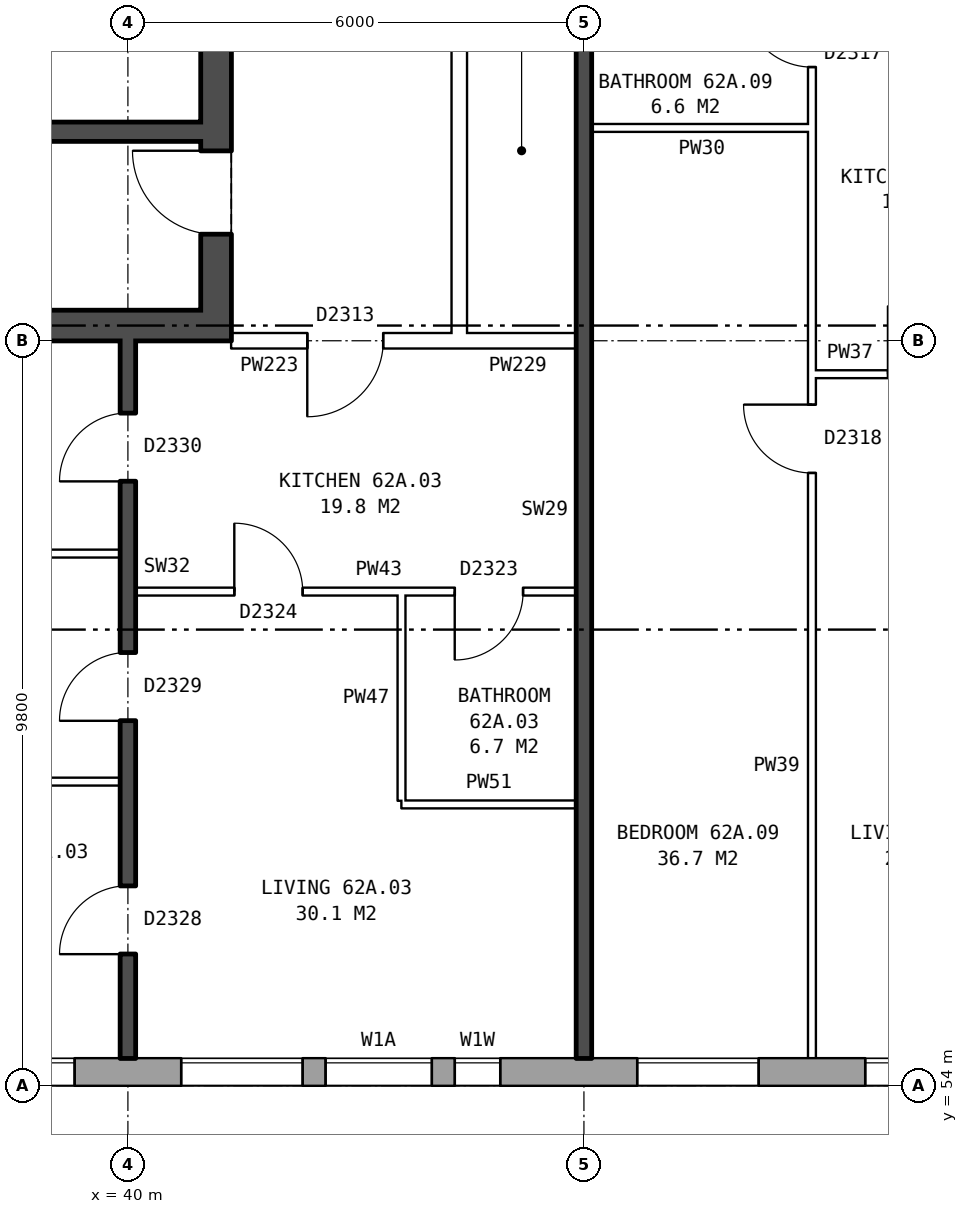
"""IFC4 building model, lengths in metres.
Left out: names, types, materials, properties, quantities, classifications, styles, units other than length and angle.
Written with IfcOpenShell. Run it as: python <this file> out.ifc"""

import sys

from ifc_helpers import new_model, si_unit, direction, frame, frame_2d, origin, place, context, subcontext, project, spatial, rectangle, extrude, element, fill, save


model = new_model("IFC4")
c1 = context("Model", 3, precision=1e-05, world=origin(), true_north=direction((0.0, 1.0)))
c2 = subcontext(c1, "Body", "Model", "MODEL_VIEW")
j1 = project(units=[si_unit("LENGTHUNIT", "METRE"), si_unit("PLANEANGLEUNIT", "RADIAN")], contexts=[c1])
p1 = place(None, origin())
s1 = spatial("IfcSite", under=j1, at=p1, CompositionType="ELEMENT")
p2 = place(p1, origin())
s2 = spatial("IfcBuilding", under=s1, at=p2, CompositionType="ELEMENT")
p3 = place(p2, frame((0.0, 0.0, 221.4)))
s3 = spatial("IfcBuildingStorey", under=s2, at=p3, CompositionType="ELEMENT", Elevation=221.4)
p4 = place(p3, frame((35.075, 54.18, 0.0), z_axis=(0.0, 0.0, 1.0), x_axis=(1.0, 0.0, 0.0)))
e1 = element("IfcWall", 1, at=p4, inside=s3, PredefinedType="STANDARD", context=c2, shape_type="SweptSolid", body=[
    extrude(rectangle(XDim=39.875, YDim=0.36, at=frame_2d((19.938, 0.0))), origin(), (0.0, 0.0, 1.0), 2.85),
])
p5 = place(p4, frame((2.625, 0.0, 0.8)))
e2 = element("IfcOpeningElement", 2, at=p5, cuts=e1, PredefinedType="OPENING", context=c2, shape_type="SweptSolid", body=[
    extrude(rectangle(XDim=1.6, YDim=1.8, at=frame_2d((0.8, 0.9))), frame((0.0, 0.19, 0.0), z_axis=(0.0, -1.0, 0.0), x_axis=(1.0, 0.0, 0.0)), (0.0, 0.0, 1.0), 0.38),
])
p6 = place(p4, frame((5.625, 0.0, 0.8)))
e3 = element("IfcOpeningElement", 3, at=p6, cuts=e1, PredefinedType="OPENING", context=c2, shape_type="SweptSolid", body=[
    extrude(rectangle(XDim=1.6, YDim=1.8, at=frame_2d((0.8, 0.9))), frame((0.0, 0.19, 0.0), z_axis=(0.0, -1.0, 0.0), x_axis=(1.0, 0.0, 0.0)), (0.0, 0.0, 1.0), 0.38),
])
p7 = place(p4, frame((7.525, 0.0, 0.8)))
e4 = element("IfcOpeningElement", 4, at=p7, cuts=e1, PredefinedType="OPENING", context=c2, shape_type="SweptSolid", body=[
    extrude(rectangle(XDim=1.4, YDim=1.8, at=frame_2d((0.7, 0.9))), frame((0.0, 0.19, 0.0), z_axis=(0.0, -1.0, 0.0), x_axis=(1.0, 0.0, 0.0)), (0.0, 0.0, 1.0), 0.38),
])
p8 = place(p4, frame((11.625, 0.0, 0.8)))
e5 = element("IfcOpeningElement", 5, at=p8, cuts=e1, PredefinedType="OPENING", context=c2, shape_type="SweptSolid", body=[
    extrude(rectangle(XDim=1.6, YDim=1.8, at=frame_2d((0.8, 0.9))), frame((0.0, 0.19, 0.0), z_axis=(0.0, -1.0, 0.0), x_axis=(1.0, 0.0, 0.0)), (0.0, 0.0, 1.0), 0.38),
])
p9 = place(p4, frame((14.625, 0.0, 0.8)))
e6 = element("IfcOpeningElement", 6, at=p9, cuts=e1, PredefinedType="OPENING", context=c2, shape_type="SweptSolid", body=[
    extrude(rectangle(XDim=1.6, YDim=1.8, at=frame_2d((0.8, 0.9))), frame((0.0, 0.19, 0.0), z_axis=(0.0, -1.0, 0.0), x_axis=(1.0, 0.0, 0.0)), (0.0, 0.0, 1.0), 0.38),
])
p10 = place(p4, frame((17.625, 0.0, 0.8)))
e7 = element("IfcOpeningElement", 7, at=p10, cuts=e1, PredefinedType="OPENING", context=c2, shape_type="SweptSolid", body=[
    extrude(rectangle(XDim=1.6, YDim=1.8, at=frame_2d((0.8, 0.9))), frame((0.0, 0.19, 0.0), z_axis=(0.0, -1.0, 0.0), x_axis=(1.0, 0.0, 0.0)), (0.0, 0.0, 1.0), 0.38),
])
p11 = place(p4, frame((20.625, 0.0, 0.8)))
e8 = element("IfcOpeningElement", 8, at=p11, cuts=e1, PredefinedType="OPENING", context=c2, shape_type="SweptSolid", body=[
    extrude(rectangle(XDim=1.6, YDim=1.8, at=frame_2d((0.8, 0.9))), frame((0.0, 0.19, 0.0), z_axis=(0.0, -1.0, 0.0), x_axis=(1.0, 0.0, 0.0)), (0.0, 0.0, 1.0), 0.38),
])
p12 = place(p4, frame((23.625, 0.0, 0.8)))
e9 = element("IfcOpeningElement", 9, at=p12, cuts=e1, PredefinedType="OPENING", context=c2, shape_type="SweptSolid", body=[
    extrude(rectangle(XDim=1.6, YDim=1.8, at=frame_2d((0.8, 0.9))), frame((0.0, 0.19, 0.0), z_axis=(0.0, -1.0, 0.0), x_axis=(1.0, 0.0, 0.0)), (0.0, 0.0, 1.0), 0.38),
])
p13 = place(p4, frame((26.075, 0.0, 0.15)))
e10 = element("IfcOpeningElement", 10, at=p13, cuts=e1, PredefinedType="OPENING", context=c2, shape_type="SweptSolid", body=[
    extrude(rectangle(XDim=0.8, YDim=1.5, at=frame_2d((0.4, 0.75))), frame((0.0, 0.19, 0.0), z_axis=(0.0, -1.0, 0.0), x_axis=(1.0, 0.0, 0.0)), (0.0, 0.0, 1.0), 0.38),
])
p14 = place(p4, frame((29.625, 0.0, 0.8)))
e11 = element("IfcOpeningElement", 11, at=p14, cuts=e1, PredefinedType="OPENING", context=c2, shape_type="SweptSolid", body=[
    extrude(rectangle(XDim=1.6, YDim=1.8, at=frame_2d((0.8, 0.9))), frame((0.0, 0.19, 0.0), z_axis=(0.0, -1.0, 0.0), x_axis=(1.0, 0.0, 0.0)), (0.0, 0.0, 1.0), 0.38),
])
p15 = place(p4, frame((32.625, 0.0, 0.8)))
e12 = element("IfcOpeningElement", 12, at=p15, cuts=e1, PredefinedType="OPENING", context=c2, shape_type="SweptSolid", body=[
    extrude(rectangle(XDim=1.6, YDim=1.8, at=frame_2d((0.8, 0.9))), frame((0.0, 0.19, 0.0), z_axis=(0.0, -1.0, 0.0), x_axis=(1.0, 0.0, 0.0)), (0.0, 0.0, 1.0), 0.38),
])
p16 = place(p4, frame((35.625, 0.0, 0.8)))
e13 = element("IfcOpeningElement", 13, at=p16, cuts=e1, PredefinedType="OPENING", context=c2, shape_type="SweptSolid", body=[
    extrude(rectangle(XDim=1.6, YDim=1.8, at=frame_2d((0.8, 0.9))), frame((0.0, 0.19, 0.0), z_axis=(0.0, -1.0, 0.0), x_axis=(1.0, 0.0, 0.0)), (0.0, 0.0, 1.0), 0.38),
])
p17 = place(p4, frame((9.225, 0.0, 1.7)))
e14 = element("IfcOpeningElement", 14, at=p17, cuts=e1, PredefinedType="OPENING", context=c2, shape_type="SweptSolid", body=[
    extrude(rectangle(XDim=0.6, YDim=0.9, at=frame_2d((0.3, 0.45))), frame((0.0, 0.19, 0.0), z_axis=(0.0, -1.0, 0.0), x_axis=(1.0, 0.0, 0.0)), (0.0, 0.0, 1.0), 0.38),
])
p18 = place(p4, frame((28.075, 0.0, 1.65)))
e15 = element("IfcOpeningElement", 15, at=p18, cuts=e1, PredefinedType="OPENING", context=c2, shape_type="SweptSolid", body=[
    extrude(rectangle(XDim=0.6, YDim=0.9, at=frame_2d((0.3, 0.45))), frame((0.0, 0.19, 0.0), z_axis=(0.0, -1.0, 0.0), x_axis=(1.0, 0.0, 0.0)), (0.0, 0.0, 1.0), 0.38),
])
p19 = place(p3, frame((41.16, 76.2, 0.0), z_axis=(0.0, 0.0, 1.0), x_axis=(0.0, -1.0, 0.0)))
e16 = element("IfcWall", 16, at=p19, inside=s3, PredefinedType="SHEAR", context=c2, shape_type="SweptSolid", body=[
    extrude(rectangle(XDim=12.4, YDim=0.4, at=frame_2d((6.2, 0.0))), origin(), (0.0, 0.0, 1.0), 2.85),
])
p20 = place(p19, frame((1.325, 0.0, 0.0)))
e17 = element("IfcOpeningElement", 17, at=p20, cuts=e16, PredefinedType="OPENING", context=c2, shape_type="SweptSolid", body=[
    extrude(rectangle(XDim=1.1, YDim=2.1, at=frame_2d((0.55, 1.05))), frame((0.0, 0.21, 0.0), z_axis=(0.0, -1.0, 0.0), x_axis=(1.0, 0.0, 0.0)), (0.0, 0.0, 1.0), 0.42),
])
p21 = place(p19, frame((5.925, 0.0, 0.0)))
e18 = element("IfcOpeningElement", 18, at=p21, cuts=e16, PredefinedType="OPENING", context=c2, shape_type="SweptSolid", body=[
    extrude(rectangle(XDim=0.85, YDim=2.1, at=frame_2d((0.425, 1.05))), frame((0.0, 0.21, 0.0), z_axis=(0.0, -1.0, 0.0), x_axis=(1.0, 0.0, 0.0)), (0.0, 0.0, 1.0), 0.42),
])
p22 = place(p19, frame((9.9, 0.0, 0.0)))
e19 = element("IfcOpeningElement", 19, at=p22, cuts=e16, PredefinedType="OPENING", context=c2, shape_type="SweptSolid", body=[
    extrude(rectangle(XDim=1.1, YDim=2.1, at=frame_2d((0.55, 1.05))), frame((0.0, 0.21, 0.0), z_axis=(0.0, -1.0, 0.0), x_axis=(1.0, 0.0, 0.0)), (0.0, 0.0, 1.0), 0.42),
])
p23 = place(p3, frame((40.96, 64.0, 0.0), z_axis=(0.0, 0.0, 1.0), x_axis=(-1.0, 0.0, 0.0)))
e20 = element("IfcWall", 20, at=p23, inside=s3, PredefinedType="SHEAR", context=c2, shape_type="SweptSolid", body=[
    extrude(rectangle(XDim=8.2, YDim=0.4, at=frame_2d((4.1, 0.0))), origin(), (0.0, 0.0, 1.0), 2.85),
])
p24 = place(p3, frame((40.96, 66.55, 0.0), z_axis=(0.0, 0.0, 1.0), x_axis=(-1.0, 0.0, 0.0)))
e21 = element("IfcWall", 21, at=p24, inside=s3, PredefinedType="SHEAR", context=c2, shape_type="SweptSolid", body=[
    extrude(rectangle(XDim=2.525, YDim=0.25, at=frame_2d((1.262, 0.0))), origin(), (0.0, 0.0, 1.0), 2.85),
])
p25 = place(p3, frame((44.36, 63.9, 0.0), z_axis=(0.0, 0.0, 1.0), x_axis=(0.0, 1.0, 0.0)))
e22 = element("IfcWall", 22, at=p25, inside=s3, PredefinedType="PARTITIONING", context=c2, shape_type="SweptSolid", body=[
    extrude(rectangle(XDim=12.2, YDim=0.2, at=frame_2d((6.1, 0.0))), origin(), (0.0, 0.0, 1.0), 2.85),
])
p26 = place(p25, frame((5.1, 0.0, 0.0)))
e23 = element("IfcOpeningElement", 23, at=p26, cuts=e22, PredefinedType="OPENING", context=c2, shape_type="SweptSolid", body=[
    extrude(rectangle(XDim=2.0, YDim=2.1, at=frame_2d((1.0, 1.05))), frame((0.0, 0.11, 0.0), z_axis=(0.0, -1.0, 0.0), x_axis=(1.0, 0.0, 0.0)), (0.0, 0.0, 1.0), 0.22),
])
p27 = place(p3, frame((43.6, 57.7, 0.0), z_axis=(0.0, 0.0, 1.0), x_axis=(1.0, 0.0, 0.0)))
e24 = element("IfcWall", 24, at=p27, inside=s3, PredefinedType="PARTITIONING", context=c2, shape_type="SweptSolid", body=[
    extrude(rectangle(XDim=2.3, YDim=0.1, at=frame_2d((1.15, 0.0))), origin(), (0.0, 0.0, 1.0), 2.85),
])
p28 = place(p3, frame((32.36, 58.0, 0.0), z_axis=(0.0, 0.0, 1.0), x_axis=(1.0, 0.0, 0.0)))
e25 = element("IfcWall", 25, at=p28, inside=s3, PredefinedType="PARTITIONING", context=c2, shape_type="SweptSolid", body=[
    extrude(rectangle(XDim=7.54, YDim=0.1, at=frame_2d((3.77, 0.0))), origin(), (0.0, 0.0, 1.0), 2.85),
])
p29 = place(p3, frame((40.1, 60.5, 0.0), z_axis=(0.0, 0.0, 1.0), x_axis=(1.0, 0.0, 0.0)))
e26 = element("IfcWall", 26, at=p29, inside=s3, PredefinedType="PARTITIONING", context=c2, shape_type="SweptSolid", body=[
    extrude(rectangle(XDim=5.8, YDim=0.1, at=frame_2d((2.9, 0.0))), origin(), (0.0, 0.0, 1.0), 2.85),
])
p30 = place(p29, frame((1.3, 0.0, 0.0)))
e27 = element("IfcOpeningElement", 27, at=p30, cuts=e26, PredefinedType="OPENING", context=c2, shape_type="SweptSolid", body=[
    extrude(rectangle(XDim=0.9, YDim=2.1, at=frame_2d((0.45, 1.05))), frame((0.0, 0.06, 0.0), z_axis=(0.0, -1.0, 0.0), x_axis=(1.0, 0.0, 0.0)), (0.0, 0.0, 1.0), 0.12),
])
p31 = place(p29, frame((4.2, 0.0, 0.0)))
e28 = element("IfcOpeningElement", 28, at=p31, cuts=e26, PredefinedType="OPENING", context=c2, shape_type="SweptSolid", body=[
    extrude(rectangle(XDim=0.9, YDim=2.1, at=frame_2d((0.45, 1.05))), frame((0.0, 0.06, 0.0), z_axis=(0.0, -1.0, 0.0), x_axis=(1.0, 0.0, 0.0)), (0.0, 0.0, 1.0), 0.12),
])
p32 = place(p3, frame((32.36, 61.0, 0.0), z_axis=(0.0, 0.0, 1.0), x_axis=(1.0, 0.0, 0.0)))
e29 = element("IfcWall", 29, at=p32, inside=s3, PredefinedType="PARTITIONING", context=c2, shape_type="SweptSolid", body=[
    extrude(rectangle(XDim=7.54, YDim=0.1, at=frame_2d((3.77, 0.0))), origin(), (0.0, 0.0, 1.0), 2.85),
])
p33 = place(p3, frame((49.0, 63.36, 0.0), z_axis=(0.0, 0.0, 1.0), x_axis=(1.0, 0.0, 0.0)))
e30 = element("IfcWall", 30, at=p33, inside=s3, PredefinedType="PARTITIONING", context=c2, shape_type="SweptSolid", body=[
    extrude(rectangle(XDim=2.9, YDim=0.1, at=frame_2d((1.45, 0.0))), origin(), (0.0, 0.0, 1.0), 2.85),
])
p34 = place(p33, frame((1.0, 0.0, 0.0)))
e31 = element("IfcOpeningElement", 31, at=p34, cuts=e30, PredefinedType="OPENING", context=c2, shape_type="SweptSolid", body=[
    extrude(rectangle(XDim=0.9, YDim=2.1, at=frame_2d((0.45, 1.05))), frame((0.0, 0.06, 0.0), z_axis=(0.0, -1.0, 0.0), x_axis=(1.0, 0.0, 0.0)), (0.0, 0.0, 1.0), 0.12),
])
p35 = place(p3, frame((41.36, 63.8, 0.0), z_axis=(0.0, 0.0, 1.0), x_axis=(1.0, 0.0, 0.0)))
e32 = element("IfcWall", 32, at=p35, inside=s3, PredefinedType="PARTITIONING", context=c2, shape_type="SweptSolid", body=[
    extrude(rectangle(XDim=3.0, YDim=0.2, at=frame_2d((1.5, 0.0))), origin(), (0.0, 0.0, 1.0), 2.85),
])
p36 = place(p35, frame((1.0, 0.0, 0.0)))
e33 = element("IfcOpeningElement", 33, at=p36, cuts=e32, PredefinedType="OPENING", context=c2, shape_type="SweptSolid", body=[
    extrude(rectangle(XDim=1.0, YDim=2.1, at=frame_2d((0.5, 1.05))), frame((0.0, 0.11, 0.0), z_axis=(0.0, -1.0, 0.0), x_axis=(1.0, 0.0, 0.0)), (0.0, 0.0, 1.0), 0.22),
])
p37 = place(p3, frame((44.36, 63.8, 0.0), z_axis=(0.0, 0.0, 1.0), x_axis=(1.0, 0.0, 0.0)))
e34 = element("IfcWall", 34, at=p37, inside=s3, PredefinedType="PARTITIONING", context=c2, shape_type="SweptSolid", body=[
    extrude(rectangle(XDim=1.54, YDim=0.2, at=frame_2d((0.77, 0.0))), origin(), (0.0, 0.0, 1.0), 2.85),
])
p38 = place(p3, frame((46.1, 66.6, 0.0), z_axis=(0.0, 0.0, 1.0), x_axis=(1.0, 0.0, 0.0)))
e35 = element("IfcWall", 35, at=p38, inside=s3, PredefinedType="PARTITIONING", context=c2, shape_type="SweptSolid", body=[
    extrude(rectangle(XDim=2.9, YDim=0.1, at=frame_2d((1.45, 0.0))), origin(), (0.0, 0.0, 1.0), 2.85),
])
p39 = place(p3, frame((40.0, 54.36, 0.0), z_axis=(0.0, 0.0, 1.0), x_axis=(0.0, 1.0, 0.0)))
e36 = element("IfcWall", 36, at=p39, inside=s3, PredefinedType="SOLIDWALL", context=c2, shape_type="SweptSolid", body=[
    extrude(rectangle(XDim=9.44, YDim=0.2, at=frame_2d((4.72, 0.0))), origin(), (0.0, 0.0, 1.0), 2.85),
])
p40 = place(p39, frame((1.37, 0.0, 0.0)))
e37 = element("IfcOpeningElement", 37, at=p40, cuts=e36, PredefinedType="OPENING", context=c2, shape_type="SweptSolid", body=[
    extrude(rectangle(XDim=0.9, YDim=2.1, at=frame_2d((0.45, 1.05))), frame((0.0, 0.11, 0.0), z_axis=(0.0, -1.0, 0.0), x_axis=(1.0, 0.0, 0.0)), (0.0, 0.0, 1.0), 0.22),
])
p41 = place(p39, frame((4.44, 0.0, 0.0)))
e38 = element("IfcOpeningElement", 38, at=p41, cuts=e36, PredefinedType="OPENING", context=c2, shape_type="SweptSolid", body=[
    extrude(rectangle(XDim=0.9, YDim=2.1, at=frame_2d((0.45, 1.05))), frame((0.0, 0.11, 0.0), z_axis=(0.0, -1.0, 0.0), x_axis=(1.0, 0.0, 0.0)), (0.0, 0.0, 1.0), 0.22),
])
p42 = place(p39, frame((7.59, 0.0, 0.0)))
e39 = element("IfcOpeningElement", 39, at=p42, cuts=e36, PredefinedType="OPENING", context=c2, shape_type="SweptSolid", body=[
    extrude(rectangle(XDim=0.9, YDim=2.1, at=frame_2d((0.45, 1.05))), frame((0.0, 0.11, 0.0), z_axis=(0.0, -1.0, 0.0), x_axis=(1.0, 0.0, 0.0)), (0.0, 0.0, 1.0), 0.22),
])
p43 = place(p3, frame((43.6, 57.75, 0.0), z_axis=(0.0, 0.0, 1.0), x_axis=(0.0, 1.0, 0.0)))
e40 = element("IfcWall", 40, at=p43, inside=s3, PredefinedType="PARTITIONING", context=c2, shape_type="SweptSolid", body=[
    extrude(rectangle(XDim=2.7, YDim=0.1, at=frame_2d((1.35, 0.0))), origin(), (0.0, 0.0, 1.0), 2.85),
])
p44 = place(p3, frame((46.0, 54.36, 0.0), z_axis=(0.0, 0.0, 1.0), x_axis=(0.0, 1.0, 0.0)))
e41 = element("IfcWall", 41, at=p44, inside=s3, PredefinedType="SOLIDWALL", context=c2, shape_type="SweptSolid", body=[
    extrude(rectangle(XDim=14.44, YDim=0.2, at=frame_2d((7.22, 0.0))), origin(), (0.0, 0.0, 1.0), 2.85),
])
p45 = place(p3, frame((49.0, 54.36, 0.0), z_axis=(0.0, 0.0, 1.0), x_axis=(0.0, 1.0, 0.0)))
e42 = element("IfcWall", 42, at=p45, inside=s3, PredefinedType="PARTITIONING", context=c2, shape_type="SweptSolid", body=[
    extrude(rectangle(XDim=14.34, YDim=0.1, at=frame_2d((7.17, 0.0))), origin(), (0.0, 0.0, 1.0), 2.85),
])
p46 = place(p45, frame((7.7, 0.0, 0.0)))
e43 = element("IfcOpeningElement", 43, at=p46, cuts=e42, PredefinedType="OPENING", context=c2, shape_type="SweptSolid", body=[
    extrude(rectangle(XDim=0.9, YDim=2.1, at=frame_2d((0.45, 1.05))), frame((0.0, 0.06, 0.0), z_axis=(0.0, -1.0, 0.0), x_axis=(1.0, 0.0, 0.0)), (0.0, 0.0, 1.0), 0.12),
])
p47 = place(p45, frame((13.04, 0.0, 0.0)))
e44 = element("IfcOpeningElement", 44, at=p47, cuts=e42, PredefinedType="OPENING", context=c2, shape_type="SweptSolid", body=[
    extrude(rectangle(XDim=0.9, YDim=2.1, at=frame_2d((0.45, 1.05))), frame((0.0, 0.06, 0.0), z_axis=(0.0, -1.0, 0.0), x_axis=(1.0, 0.0, 0.0)), (0.0, 0.0, 1.0), 0.12),
])
p48 = place(p5, origin())
e45 = element("IfcWindow", 45, at=p48, inside=s3, PartitioningType="SINGLE_PANEL", PredefinedType="WINDOW", context=c2, shape_type="SweptSolid", body=[
    extrude(rectangle(XDim=1.6, YDim=1.8, at=frame_2d((0.8, 0.9))), frame((0.0, 0.15, 0.0), z_axis=(0.0, -1.0, 0.0), x_axis=(1.0, 0.0, 0.0)), (0.0, 0.0, 1.0), 0.06),
])
fill(e2, e45)
p49 = place(p6, origin())
e46 = element("IfcWindow", 46, at=p49, inside=s3, PartitioningType="SINGLE_PANEL", PredefinedType="WINDOW", context=c2, shape_type="SweptSolid", body=[
    extrude(rectangle(XDim=1.6, YDim=1.8, at=frame_2d((0.8, 0.9))), frame((0.0, 0.15, 0.0), z_axis=(0.0, -1.0, 0.0), x_axis=(1.0, 0.0, 0.0)), (0.0, 0.0, 1.0), 0.06),
])
fill(e3, e46)
p50 = place(p7, origin())
e47 = element("IfcWindow", 47, at=p50, inside=s3, PartitioningType="SINGLE_PANEL", PredefinedType="WINDOW", context=c2, shape_type="SweptSolid", body=[
    extrude(rectangle(XDim=1.4, YDim=1.8, at=frame_2d((0.7, 0.9))), frame((0.0, 0.15, 0.0), z_axis=(0.0, -1.0, 0.0), x_axis=(1.0, 0.0, 0.0)), (0.0, 0.0, 1.0), 0.06),
])
fill(e4, e47)
p51 = place(p8, origin())
e48 = element("IfcWindow", 48, at=p51, inside=s3, PartitioningType="SINGLE_PANEL", PredefinedType="WINDOW", context=c2, shape_type="SweptSolid", body=[
    extrude(rectangle(XDim=1.6, YDim=1.8, at=frame_2d((0.8, 0.9))), frame((0.0, 0.15, 0.0), z_axis=(0.0, -1.0, 0.0), x_axis=(1.0, 0.0, 0.0)), (0.0, 0.0, 1.0), 0.06),
])
fill(e5, e48)
p52 = place(p9, origin())
e49 = element("IfcWindow", 49, at=p52, inside=s3, PartitioningType="SINGLE_PANEL", PredefinedType="WINDOW", context=c2, shape_type="SweptSolid", body=[
    extrude(rectangle(XDim=1.6, YDim=1.8, at=frame_2d((0.8, 0.9))), frame((0.0, 0.15, 0.0), z_axis=(0.0, -1.0, 0.0), x_axis=(1.0, 0.0, 0.0)), (0.0, 0.0, 1.0), 0.06),
])
fill(e6, e49)
p53 = place(p22, frame((1.1, 0.0, 0.0), z_axis=(0.0, 0.0, 1.0), x_axis=(-1.0, 0.0, 0.0)))
e50 = element("IfcDoor", 50, at=p53, inside=s3, OperationType="SINGLE_SWING_RIGHT", PredefinedType="DOOR", context=c2, shape_type="SweptSolid", body=[
    extrude(rectangle(XDim=1.1, YDim=2.1, at=frame_2d((0.55, 1.05))), frame((0.0, 0.185, 0.0), z_axis=(0.0, -1.0, 0.0), x_axis=(1.0, 0.0, 0.0)), (0.0, 0.0, 1.0), 0.05),
])
fill(e19, e50)
p54 = place(p40, origin())
e51 = element("IfcDoor", 51, at=p54, inside=s3, OperationType="SINGLE_SWING_LEFT", PredefinedType="DOOR", context=c2, shape_type="SweptSolid", body=[
    extrude(rectangle(XDim=0.9, YDim=2.1, at=frame_2d((0.45, 1.05))), frame((0.0, 0.025, 0.0), z_axis=(0.0, -1.0, 0.0), x_axis=(1.0, 0.0, 0.0)), (0.0, 0.0, 1.0), 0.05),
])
fill(e37, e51)
p55 = place(p41, origin())
e52 = element("IfcDoor", 52, at=p55, inside=s3, OperationType="SINGLE_SWING_LEFT", PredefinedType="DOOR", context=c2, shape_type="SweptSolid", body=[
    extrude(rectangle(XDim=0.9, YDim=2.1, at=frame_2d((0.45, 1.05))), frame((0.0, 0.025, 0.0), z_axis=(0.0, -1.0, 0.0), x_axis=(1.0, 0.0, 0.0)), (0.0, 0.0, 1.0), 0.05),
])
fill(e38, e52)
p56 = place(p42, origin())
e53 = element("IfcDoor", 53, at=p56, inside=s3, OperationType="SINGLE_SWING_LEFT", PredefinedType="DOOR", context=c2, shape_type="SweptSolid", body=[
    extrude(rectangle(XDim=0.9, YDim=2.1, at=frame_2d((0.45, 1.05))), frame((0.0, 0.025, 0.0), z_axis=(0.0, -1.0, 0.0), x_axis=(1.0, 0.0, 0.0)), (0.0, 0.0, 1.0), 0.05),
])
fill(e39, e53)
p57 = place(p36, frame((1.0, 0.0, 0.0), z_axis=(0.0, 0.0, 1.0), x_axis=(-1.0, 0.0, 0.0)))
e54 = element("IfcDoor", 54, at=p57, inside=s3, OperationType="SINGLE_SWING_RIGHT", PredefinedType="DOOR", context=c2, shape_type="SweptSolid", body=[
    extrude(rectangle(XDim=1.0, YDim=2.1, at=frame_2d((0.5, 1.05))), frame((0.0, 0.025, 0.0), z_axis=(0.0, -1.0, 0.0), x_axis=(1.0, 0.0, 0.0)), (0.0, 0.0, 1.0), 0.05),
])
fill(e33, e54)
p58 = place(p30, origin())
e55 = element("IfcDoor", 55, at=p58, inside=s3, OperationType="SINGLE_SWING_LEFT", PredefinedType="DOOR", context=c2, shape_type="SweptSolid", body=[
    extrude(rectangle(XDim=0.9, YDim=2.1, at=frame_2d((0.45, 1.05))), frame((0.0, 0.025, 0.0), z_axis=(0.0, -1.0, 0.0), x_axis=(1.0, 0.0, 0.0)), (0.0, 0.0, 1.0), 0.05),
])
fill(e27, e55)
p59 = place(p31, frame((0.9, 0.0, 0.0), z_axis=(0.0, 0.0, 1.0), x_axis=(-1.0, 0.0, 0.0)))
e56 = element("IfcDoor", 56, at=p59, inside=s3, OperationType="SINGLE_SWING_RIGHT", PredefinedType="DOOR", context=c2, shape_type="SweptSolid", body=[
    extrude(rectangle(XDim=0.9, YDim=2.1, at=frame_2d((0.45, 1.05))), frame((0.0, 0.025, 0.0), z_axis=(0.0, -1.0, 0.0), x_axis=(1.0, 0.0, 0.0)), (0.0, 0.0, 1.0), 0.05),
])
fill(e28, e56)
p60 = place(p46, origin())
e57 = element("IfcDoor", 57, at=p60, inside=s3, OperationType="SINGLE_SWING_RIGHT", PredefinedType="DOOR", context=c2, shape_type="SweptSolid", body=[
    extrude(rectangle(XDim=0.9, YDim=2.1, at=frame_2d((0.45, 1.05))), frame((0.0, 0.025, 0.0), z_axis=(0.0, -1.0, 0.0), x_axis=(1.0, 0.0, 0.0)), (0.0, 0.0, 1.0), 0.05),
])
fill(e43, e57)
p61 = place(p47, origin())
e58 = element("IfcDoor", 58, at=p61, inside=s3, OperationType="SINGLE_SWING_RIGHT", PredefinedType="DOOR", context=c2, shape_type="SweptSolid", body=[
    extrude(rectangle(XDim=0.9, YDim=2.1, at=frame_2d((0.45, 1.05))), frame((0.0, 0.025, 0.0), z_axis=(0.0, -1.0, 0.0), x_axis=(1.0, 0.0, 0.0)), (0.0, 0.0, 1.0), 0.05),
])
fill(e44, e58)
p62 = place(p17, origin())
e59 = element("IfcWindow", 59, at=p62, inside=s3, PartitioningType="SINGLE_PANEL", PredefinedType="WINDOW", context=c2, shape_type="SweptSolid", body=[
    extrude(rectangle(XDim=0.6, YDim=0.9, at=frame_2d((0.3, 0.45))), frame((0.0, 0.15, 0.0), z_axis=(0.0, -1.0, 0.0), x_axis=(1.0, 0.0, 0.0)), (0.0, 0.0, 1.0), 0.06),
])
fill(e14, e59)
save(model, sys.argv[1])
